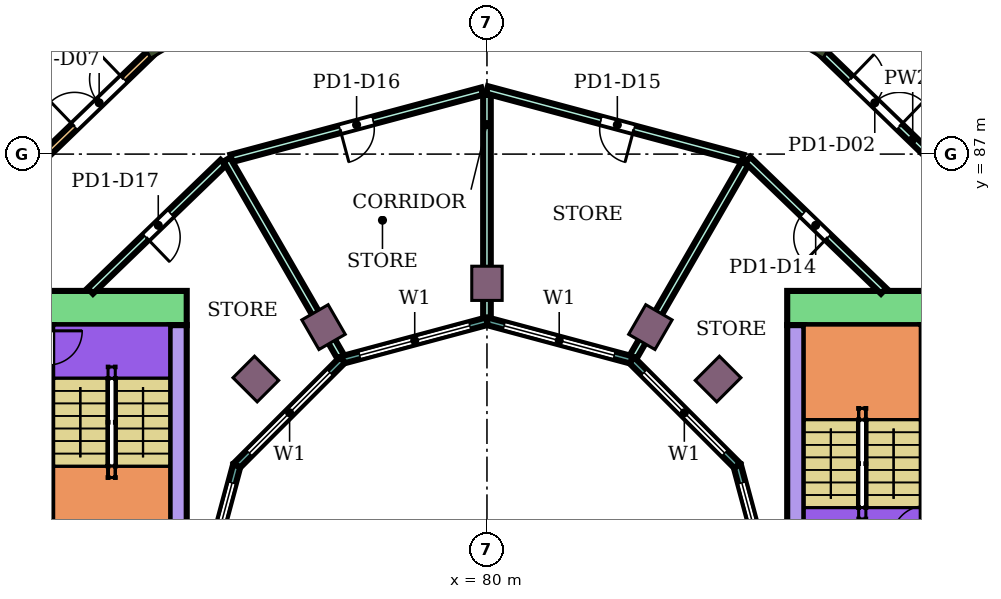
"""IFC4 building model, lengths in metres.
Left out: names, types, materials, properties, quantities, classifications, styles, units other than length and angle.
Written with IfcOpenShell. Run it as: python <this file> out.ifc"""

import sys

from ifc_helpers import new_model, si_unit, direction, frame, frame_2d, origin, origin_2d, place, context, subcontext, project, spatial, rectangle, extrude, element, fill, save


model = new_model("IFC4")
c1 = context("Model", 3, precision=1e-05, world=origin(), true_north=direction((0.0, 1.0)))
c2 = subcontext(c1, "Body", "Model", "MODEL_VIEW")
j1 = project(units=[si_unit("LENGTHUNIT", "METRE"), si_unit("PLANEANGLEUNIT", "RADIAN")], contexts=[c1])
p1 = place(None, origin())
s1 = spatial("IfcSite", under=j1, at=p1, CompositionType="ELEMENT")
p2 = place(p1, origin())
s2 = spatial("IfcBuilding", under=s1, at=p2, CompositionType="ELEMENT")
p3 = place(p2, frame((0.0, 0.0, 7.0)))
s3 = spatial("IfcBuildingStorey", under=s2, at=p3, CompositionType="ELEMENT", Elevation=7.0)
for number, where, z_axis, x_axis in (
    (1, (88.8, 90.242, 0.0), (0.0, 0.0, 1.0), (0.5, 0.866, 0.0)),
    (2, (71.2, 90.242, 0.0), (0.0, 0.0, 1.0), (-0.5, 0.866, 0.0)),
):
    element("IfcColumn", number, at=place(p3, frame(where, z_axis=z_axis, x_axis=x_axis)), inside=s3, PredefinedType="COLUMN", context=c2, shape_type="SweptSolid", body=[
        extrude(rectangle(XDim=1.2, YDim=0.8, at=origin_2d()), origin(), (0.0, 0.0, 1.0), 5.4),
    ])
for number, where, z_axis, x_axis in (
    (3, (86.081, 81.081, 0.0), (0.0, 0.0, 1.0), (0.707, 0.707, 0.0)),
    (4, (84.3, 82.448, 0.0), (0.0, 0.0, 1.0), (0.5, 0.866, 0.0)),
    (5, (80.0, 83.6, 0.0), (0.0, 0.0, 1.0), (0.0, 1.0, 0.0)),
    (6, (75.7, 82.448, 0.0), (0.0, 0.0, 1.0), (-0.5, 0.866, 0.0)),
    (7, (73.919, 81.081, 0.0), (0.0, 0.0, 1.0), (-0.707, 0.707, 0.0)),
):
    element("IfcColumn", number, at=place(p3, frame(where, z_axis=z_axis, x_axis=x_axis)), inside=s3, PredefinedType="COLUMN", context=c2, shape_type="SweptSolid", body=[
        extrude(rectangle(XDim=0.9, YDim=0.8, at=origin_2d()), origin(), (0.0, 0.0, 1.0), 5.4),
    ])
p4 = place(p3, frame((87.9, 82.95, 0.0), z_axis=(0.0, 0.0, 1.0), x_axis=(1.0, 0.0, 0.0)))
e8 = element("IfcWall", 8, at=p4, inside=s3, PredefinedType="SHEAR", context=c2, shape_type="SweptSolid", body=[
    extrude(rectangle(XDim=14.6, YDim=0.9, at=frame_2d((7.3, 0.0))), origin(), (0.0, 0.0, 1.0), 4.95),
])
p5 = place(p4, frame((4.2, 0.0, 0.0)))
e9 = element("IfcOpeningElement", 9, at=p5, cuts=e8, PredefinedType="OPENING", context=c2, shape_type="SweptSolid", body=[
    extrude(rectangle(XDim=2.4, YDim=2.4, at=frame_2d((1.2, 1.2))), frame((0.0, 0.46, 0.0), z_axis=(0.0, -1.0, 0.0), x_axis=(1.0, 0.0, 0.0)), (0.0, 0.0, 1.0), 0.92),
])
p6 = place(p3, frame((88.125, 75.0, 0.0), z_axis=(0.0, 0.0, 1.0), x_axis=(0.0, 1.0, 0.0)))
e10 = element("IfcWall", 10, at=p6, inside=s3, PredefinedType="SHEAR", context=c2, shape_type="SweptSolid", body=[
    extrude(rectangle(XDim=7.5, YDim=0.45, at=frame_2d((3.75, 0.0))), origin(), (0.0, 0.0, 1.0), 4.95),
])
p7 = place(p3, frame((91.55, 75.0, 0.0), z_axis=(0.0, 0.0, 1.0), x_axis=(0.0, 1.0, 0.0)))
e11 = element("IfcWall", 11, at=p7, inside=s3, PredefinedType="SHEAR", context=c2, shape_type="SweptSolid", body=[
    extrude(rectangle(XDim=7.5, YDim=0.3, at=frame_2d((3.75, 0.0))), origin(), (0.0, 0.0, 1.0), 4.95),
])
p8 = place(p7, frame((1.85, 0.0, 0.0)))
e12 = element("IfcOpeningElement", 12, at=p8, cuts=e11, PredefinedType="OPENING", context=c2, shape_type="SweptSolid", body=[
    extrude(rectangle(XDim=0.9, YDim=2.1, at=frame_2d((0.45, 1.05))), frame((0.0, 0.16, 0.0), z_axis=(0.0, -1.0, 0.0), x_axis=(1.0, 0.0, 0.0)), (0.0, 0.0, 1.0), 0.32),
])
p9 = place(p3, frame((72.1, 82.95, 0.0), z_axis=(0.0, 0.0, 1.0), x_axis=(-1.0, 0.0, 0.0)))
e13 = element("IfcWall", 13, at=p9, inside=s3, PredefinedType="SHEAR", context=c2, shape_type="SweptSolid", body=[
    extrude(rectangle(XDim=14.6, YDim=0.9, at=frame_2d((7.3, 0.0))), origin(), (0.0, 0.0, 1.0), 4.95),
])
p10 = place(p9, frame((4.2, 0.0, 0.0)))
e14 = element("IfcOpeningElement", 14, at=p10, cuts=e13, PredefinedType="OPENING", context=c2, shape_type="SweptSolid", body=[
    extrude(rectangle(XDim=2.4, YDim=2.4, at=frame_2d((1.2, 1.2))), frame((0.0, 0.46, 0.0), z_axis=(0.0, -1.0, 0.0), x_axis=(1.0, 0.0, 0.0)), (0.0, 0.0, 1.0), 0.92),
])
p11 = place(p3, frame((71.875, 82.5, 0.0), z_axis=(0.0, 0.0, 1.0), x_axis=(0.0, -1.0, 0.0)))
e15 = element("IfcWall", 15, at=p11, inside=s3, PredefinedType="SHEAR", context=c2, shape_type="SweptSolid", body=[
    extrude(rectangle(XDim=7.5, YDim=0.45, at=frame_2d((3.75, 0.0))), origin(), (0.0, 0.0, 1.0), 4.95),
])
p12 = place(p3, frame((68.45, 82.5, 0.0), z_axis=(0.0, 0.0, 1.0), x_axis=(0.0, -1.0, 0.0)))
e16 = element("IfcWall", 16, at=p12, inside=s3, PredefinedType="SHEAR", context=c2, shape_type="SweptSolid", body=[
    extrude(rectangle(XDim=7.5, YDim=0.3, at=frame_2d((3.75, 0.0))), origin(), (0.0, 0.0, 1.0), 4.95),
])
p13 = place(p12, frame((0.15, 0.0, 0.0)))
e17 = element("IfcOpeningElement", 17, at=p13, cuts=e16, PredefinedType="OPENING", context=c2, shape_type="SweptSolid", body=[
    extrude(rectangle(XDim=0.9, YDim=2.1, at=frame_2d((0.45, 1.05))), frame((0.0, 0.16, 0.0), z_axis=(0.0, -1.0, 0.0), x_axis=(1.0, 0.0, 0.0)), (0.0, 0.0, 1.0), 0.32),
])
p14 = place(p3, frame((87.604, 75.0, 0.0), z_axis=(0.0, 0.0, 1.0), x_axis=(-0.258789828301, 0.965933654434, 0.0)))
e18 = element("IfcWall", 18, at=p14, inside=s3, PredefinedType="NOTDEFINED", context=c2, shape_type="SweptSolid", body=[
    extrude(rectangle(XDim=3.936, YDim=0.2, at=frame_2d((1.968, 0.0))), origin(), (0.0, 0.0, 1.0), 5.4),
])
p15 = place(p14, frame((0.468, 0.0, 0.9)))
e19 = element("IfcOpeningElement", 19, at=p15, cuts=e18, PredefinedType="OPENING", context=c2, shape_type="SweptSolid", body=[
    extrude(rectangle(XDim=3.0, YDim=2.3, at=frame_2d((1.5, 1.15))), frame((0.0, 0.11, 0.0), z_axis=(0.0, -1.0, 0.0), x_axis=(1.0, 0.0, 0.0)), (0.0, 0.0, 1.0), 0.22),
])
p16 = place(p3, frame((86.585, 78.802, 0.0), z_axis=(0.0, 0.0, 1.0), x_axis=(-0.707106781187, 0.707106781187, 0.0)))
e20 = element("IfcWall", 20, at=p16, inside=s3, PredefinedType="NOTDEFINED", context=c2, shape_type="SweptSolid", body=[
    extrude(rectangle(XDim=3.936, YDim=0.2, at=frame_2d((1.968, 0.0))), origin(), (0.0, 0.0, 1.0), 5.4),
])
p17 = place(p16, frame((0.468, 0.0, 0.9)))
e21 = element("IfcOpeningElement", 21, at=p17, cuts=e20, PredefinedType="OPENING", context=c2, shape_type="SweptSolid", body=[
    extrude(rectangle(XDim=3.0, YDim=2.3, at=frame_2d((1.5, 1.15))), frame((0.0, 0.11, 0.0), z_axis=(0.0, -1.0, 0.0), x_axis=(1.0, 0.0, 0.0)), (0.0, 0.0, 1.0), 0.22),
])
p18 = place(p3, frame((83.802, 81.585, 0.0), z_axis=(0.0, 0.0, 1.0), x_axis=(-0.965933654434, 0.258789828301, 0.0)))
e22 = element("IfcWall", 22, at=p18, inside=s3, PredefinedType="NOTDEFINED", context=c2, shape_type="SweptSolid", body=[
    extrude(rectangle(XDim=3.936, YDim=0.2, at=frame_2d((1.968, 0.0))), origin(), (0.0, 0.0, 1.0), 5.4),
])
p19 = place(p18, frame((0.468, 0.0, 0.9)))
e23 = element("IfcOpeningElement", 23, at=p19, cuts=e22, PredefinedType="OPENING", context=c2, shape_type="SweptSolid", body=[
    extrude(rectangle(XDim=3.0, YDim=2.3, at=frame_2d((1.5, 1.15))), frame((0.0, 0.11, 0.0), z_axis=(0.0, -1.0, 0.0), x_axis=(1.0, 0.0, 0.0)), (0.0, 0.0, 1.0), 0.22),
])
p20 = place(p3, frame((80.0, 82.604, 0.0), z_axis=(0.0, 0.0, 1.0), x_axis=(-0.965933654434, -0.258789828301, 0.0)))
e24 = element("IfcWall", 24, at=p20, inside=s3, PredefinedType="NOTDEFINED", context=c2, shape_type="SweptSolid", body=[
    extrude(rectangle(XDim=3.936, YDim=0.2, at=frame_2d((1.968, 0.0))), origin(), (0.0, 0.0, 1.0), 5.4),
])
p21 = place(p20, frame((0.468, 0.0, 0.9)))
e25 = element("IfcOpeningElement", 25, at=p21, cuts=e24, PredefinedType="OPENING", context=c2, shape_type="SweptSolid", body=[
    extrude(rectangle(XDim=3.0, YDim=2.3, at=frame_2d((1.5, 1.15))), frame((0.0, 0.11, 0.0), z_axis=(0.0, -1.0, 0.0), x_axis=(1.0, 0.0, 0.0)), (0.0, 0.0, 1.0), 0.22),
])
p22 = place(p3, frame((76.198, 81.585, 0.0), z_axis=(0.0, 0.0, 1.0), x_axis=(-0.707106781187, -0.707106781187, 0.0)))
e26 = element("IfcWall", 26, at=p22, inside=s3, PredefinedType="NOTDEFINED", context=c2, shape_type="SweptSolid", body=[
    extrude(rectangle(XDim=3.936, YDim=0.2, at=frame_2d((1.968, 0.0))), origin(), (0.0, 0.0, 1.0), 5.4),
])
p23 = place(p22, frame((0.468, 0.0, 0.9)))
e27 = element("IfcOpeningElement", 27, at=p23, cuts=e26, PredefinedType="OPENING", context=c2, shape_type="SweptSolid", body=[
    extrude(rectangle(XDim=3.0, YDim=2.3, at=frame_2d((1.5, 1.15))), frame((0.0, 0.11, 0.0), z_axis=(0.0, -1.0, 0.0), x_axis=(1.0, 0.0, 0.0)), (0.0, 0.0, 1.0), 0.22),
])
p24 = place(p3, frame((73.415, 78.802, 0.0), z_axis=(0.0, 0.0, 1.0), x_axis=(-0.258789828301, -0.965933654434, 0.0)))
e28 = element("IfcWall", 28, at=p24, inside=s3, PredefinedType="NOTDEFINED", context=c2, shape_type="SweptSolid", body=[
    extrude(rectangle(XDim=3.936, YDim=0.2, at=frame_2d((1.968, 0.0))), origin(), (0.0, 0.0, 1.0), 5.4),
])
p25 = place(p24, frame((0.468, 0.0, 0.9)))
e29 = element("IfcOpeningElement", 29, at=p25, cuts=e28, PredefinedType="OPENING", context=c2, shape_type="SweptSolid", body=[
    extrude(rectangle(XDim=3.0, YDim=2.3, at=frame_2d((1.5, 1.15))), frame((0.0, 0.11, 0.0), z_axis=(0.0, -1.0, 0.0), x_axis=(1.0, 0.0, 0.0)), (0.0, 0.0, 1.0), 0.22),
])
p26 = place(p3, frame((66.22, 84.9, 0.0), z_axis=(0.0, 0.0, 1.0), x_axis=(0.719621348931, 0.694366700068, 0.0)))
e30 = element("IfcWall", 30, at=p26, inside=s3, PredefinedType="PARTITIONING", context=c2, shape_type="SweptSolid", body=[
    extrude(rectangle(XDim=7.173, YDim=0.2, at=frame_2d((3.586, 0.0))), origin(), (0.0, 0.0, 1.0), 4.45),
])
p27 = place(p26, frame((4.069, 0.0, 0.0)))
e31 = element("IfcOpeningElement", 31, at=p27, cuts=e30, PredefinedType="OPENING", context=c2, shape_type="SweptSolid", body=[
    extrude(rectangle(XDim=1.8, YDim=2.1, at=frame_2d((0.9, 1.05))), frame((0.0, 0.11, 0.0), z_axis=(0.0, -1.0, 0.0), x_axis=(1.0, 0.0, 0.0)), (0.0, 0.0, 1.0), 0.22),
])
p28 = place(p26, frame((0.932, 0.0, 0.0)))
e32 = element("IfcOpeningElement", 32, at=p28, cuts=e30, PredefinedType="OPENING", context=c2, shape_type="SweptSolid", body=[
    extrude(rectangle(XDim=0.9, YDim=2.1, at=frame_2d((0.45, 1.05))), frame((0.0, 0.11, 0.0), z_axis=(0.0, -1.0, 0.0), x_axis=(1.0, 0.0, 0.0)), (0.0, 0.0, 1.0), 0.22),
])
p29 = place(p3, frame((69.563, 83.4, 0.0), z_axis=(0.0, 0.0, 1.0), x_axis=(0.719454254864, 0.694539829785, 0.0)))
e33 = element("IfcWall", 33, at=p29, inside=s3, PredefinedType="PARTITIONING", context=c2, shape_type="SweptSolid", body=[
    extrude(rectangle(XDim=4.86, YDim=0.2, at=frame_2d((2.43, 0.0))), origin(), (0.0, 0.0, 1.0), 4.95),
])
p30 = place(p29, frame((2.035, 0.0, 0.0)))
e34 = element("IfcOpeningElement", 34, at=p30, cuts=e33, PredefinedType="OPENING", context=c2, shape_type="SweptSolid", body=[
    extrude(rectangle(XDim=0.9, YDim=2.1, at=frame_2d((0.45, 1.05))), frame((0.0, 0.11, 0.0), z_axis=(0.0, -1.0, 0.0), x_axis=(1.0, 0.0, 0.0)), (0.0, 0.0, 1.0), 0.22),
])
p31 = place(p3, frame((73.274, 86.888, 0.0), z_axis=(0.0, 0.0, 1.0), x_axis=(0.965941353683, 0.258761089124, 0.0)))
e35 = element("IfcWall", 35, at=p31, inside=s3, PredefinedType="PARTITIONING", context=c2, shape_type="SweptSolid", body=[
    extrude(rectangle(XDim=6.833, YDim=0.2, at=frame_2d((3.417, 0.0))), origin(), (0.0, 0.0, 1.0), 4.95),
])
p32 = place(p31, frame((2.961, 0.0, 0.0)))
e36 = element("IfcOpeningElement", 36, at=p32, cuts=e35, PredefinedType="OPENING", context=c2, shape_type="SweptSolid", body=[
    extrude(rectangle(XDim=0.9, YDim=2.1, at=frame_2d((0.45, 1.05))), frame((0.0, 0.11, 0.0), z_axis=(0.0, -1.0, 0.0), x_axis=(1.0, 0.0, 0.0)), (0.0, 0.0, 1.0), 0.22),
])
p33 = place(p3, frame((73.155, 86.856, 0.0), z_axis=(0.0, 0.0, 1.0), x_axis=(0.499999919892, -0.866025450035, 0.0)))
e37 = element("IfcWall", 37, at=p33, inside=s3, PredefinedType="PARTITIONING", context=c2, shape_type="SweptSolid", body=[
    extrude(rectangle(XDim=5.992, YDim=0.2, at=frame_2d((2.996, 0.0))), origin(), (0.0, 0.0, 1.0), 4.95),
])
p34 = place(p3, frame((80.0, 82.699, 0.0), z_axis=(0.0, 0.0, 1.0), x_axis=(0.0, 1.0, 0.0)))
e38 = element("IfcWall", 38, at=p34, inside=s3, PredefinedType="PARTITIONING", context=c2, shape_type="SweptSolid", body=[
    extrude(rectangle(XDim=5.861, YDim=0.2, at=frame_2d((2.931, 0.0))), origin(), (0.0, 0.0, 1.0), 4.95),
])
p35 = place(p3, frame((80.0, 88.69, 0.0), z_axis=(0.0, 0.0, 1.0), x_axis=(0.965929896633, -0.258803853893, 0.0)))
e39 = element("IfcWall", 39, at=p35, inside=s3, PredefinedType="PARTITIONING", context=c2, shape_type="SweptSolid", body=[
    extrude(rectangle(XDim=6.963, YDim=0.2, at=frame_2d((3.481, 0.0))), origin(), (0.0, 0.0, 1.0), 4.95),
])
p36 = place(p35, frame((3.102, 0.0, 0.0)))
e40 = element("IfcOpeningElement", 40, at=p36, cuts=e39, PredefinedType="OPENING", context=c2, shape_type="SweptSolid", body=[
    extrude(rectangle(XDim=0.9, YDim=2.1, at=frame_2d((0.45, 1.05))), frame((0.0, 0.11, 0.0), z_axis=(0.0, -1.0, 0.0), x_axis=(1.0, 0.0, 0.0)), (0.0, 0.0, 1.0), 0.22),
])
p37 = place(p3, frame((83.85, 81.667, 0.0), z_axis=(0.0, 0.0, 1.0), x_axis=(0.500029580911, 0.866008324564, 0.0)))
e41 = element("IfcWall", 41, at=p37, inside=s3, PredefinedType="PARTITIONING", context=c2, shape_type="SweptSolid", body=[
    extrude(rectangle(XDim=5.872, YDim=0.2, at=frame_2d((2.936, 0.0))), origin(), (0.0, 0.0, 1.0), 4.95),
])
p38 = place(p3, frame((86.861, 86.852, 0.0), z_axis=(0.0, 0.0, 1.0), x_axis=(0.719448855188, -0.694545423114, 0.0)))
e42 = element("IfcWall", 42, at=p38, inside=s3, PredefinedType="PARTITIONING", context=c2, shape_type="SweptSolid", body=[
    extrude(rectangle(XDim=4.97, YDim=0.2, at=frame_2d((2.485, 0.0))), origin(), (0.0, 0.0, 1.0), 4.95),
])
p39 = place(p38, frame((2.035, 0.0, 0.0)))
e43 = element("IfcOpeningElement", 43, at=p39, cuts=e42, PredefinedType="OPENING", context=c2, shape_type="SweptSolid", body=[
    extrude(rectangle(XDim=0.9, YDim=2.1, at=frame_2d((0.45, 1.05))), frame((0.0, 0.11, 0.0), z_axis=(0.0, -1.0, 0.0), x_axis=(1.0, 0.0, 0.0)), (0.0, 0.0, 1.0), 0.22),
])
p40 = place(p3, frame((88.668, 89.832, 0.0), z_axis=(0.0, 0.0, 1.0), x_axis=(0.71956091863, -0.694429322811, 0.0)))
e44 = element("IfcWall", 44, at=p40, inside=s3, PredefinedType="PARTITIONING", context=c2, shape_type="SweptSolid", body=[
    extrude(rectangle(XDim=7.043, YDim=0.2, at=frame_2d((3.521, 0.0))), origin(), (0.0, 0.0, 1.0), 4.95),
])
p41 = place(p40, frame((4.821, 0.0, 0.0)))
e45 = element("IfcOpeningElement", 45, at=p41, cuts=e44, PredefinedType="OPENING", context=c2, shape_type="SweptSolid", body=[
    extrude(rectangle(XDim=1.8, YDim=2.1, at=frame_2d((0.9, 1.05))), frame((0.0, 0.11, 0.0), z_axis=(0.0, -1.0, 0.0), x_axis=(1.0, 0.0, 0.0)), (0.0, 0.0, 1.0), 0.22),
])
p42 = place(p40, frame((1.234, 0.0, 0.0)))
e46 = element("IfcOpeningElement", 46, at=p42, cuts=e44, PredefinedType="OPENING", context=c2, shape_type="SweptSolid", body=[
    extrude(rectangle(XDim=1.8, YDim=2.1, at=frame_2d((0.9, 1.05))), frame((0.0, 0.11, 0.0), z_axis=(0.0, -1.0, 0.0), x_axis=(1.0, 0.0, 0.0)), (0.0, 0.0, 1.0), 0.22),
])
p43 = place(p15, origin())
e47 = element("IfcWindow", 47, at=p43, inside=s3, PartitioningType="SINGLE_PANEL", PredefinedType="WINDOW", context=c2, shape_type="SweptSolid", body=[
    extrude(rectangle(XDim=3.0, YDim=2.3, at=frame_2d((1.5, 1.15))), frame((0.0, 0.03, 0.0), z_axis=(0.0, -1.0, 0.0), x_axis=(1.0, 0.0, 0.0)), (0.0, 0.0, 1.0), 0.06),
])
fill(e19, e47)
p44 = place(p17, origin())
e48 = element("IfcWindow", 48, at=p44, inside=s3, PartitioningType="SINGLE_PANEL", PredefinedType="WINDOW", context=c2, shape_type="SweptSolid", body=[
    extrude(rectangle(XDim=3.0, YDim=2.3, at=frame_2d((1.5, 1.15))), frame((0.0, 0.03, 0.0), z_axis=(0.0, -1.0, 0.0), x_axis=(1.0, 0.0, 0.0)), (0.0, 0.0, 1.0), 0.06),
])
fill(e21, e48)
p45 = place(p19, origin())
e49 = element("IfcWindow", 49, at=p45, inside=s3, PartitioningType="SINGLE_PANEL", PredefinedType="WINDOW", context=c2, shape_type="SweptSolid", body=[
    extrude(rectangle(XDim=3.0, YDim=2.3, at=frame_2d((1.5, 1.15))), frame((0.0, 0.03, 0.0), z_axis=(0.0, -1.0, 0.0), x_axis=(1.0, 0.0, 0.0)), (0.0, 0.0, 1.0), 0.06),
])
fill(e23, e49)
p46 = place(p21, origin())
e50 = element("IfcWindow", 50, at=p46, inside=s3, PartitioningType="SINGLE_PANEL", PredefinedType="WINDOW", context=c2, shape_type="SweptSolid", body=[
    extrude(rectangle(XDim=3.0, YDim=2.3, at=frame_2d((1.5, 1.15))), frame((0.0, 0.03, 0.0), z_axis=(0.0, -1.0, 0.0), x_axis=(1.0, 0.0, 0.0)), (0.0, 0.0, 1.0), 0.06),
])
fill(e25, e50)
p47 = place(p23, origin())
e51 = element("IfcWindow", 51, at=p47, inside=s3, PartitioningType="SINGLE_PANEL", PredefinedType="WINDOW", context=c2, shape_type="SweptSolid", body=[
    extrude(rectangle(XDim=3.0, YDim=2.3, at=frame_2d((1.5, 1.15))), frame((0.0, 0.03, 0.0), z_axis=(0.0, -1.0, 0.0), x_axis=(1.0, 0.0, 0.0)), (0.0, 0.0, 1.0), 0.06),
])
fill(e27, e51)
p48 = place(p25, origin())
e52 = element("IfcWindow", 52, at=p48, inside=s3, PartitioningType="SINGLE_PANEL", PredefinedType="WINDOW", context=c2, shape_type="SweptSolid", body=[
    extrude(rectangle(XDim=3.0, YDim=2.3, at=frame_2d((1.5, 1.15))), frame((0.0, 0.03, 0.0), z_axis=(0.0, -1.0, 0.0), x_axis=(1.0, 0.0, 0.0)), (0.0, 0.0, 1.0), 0.06),
])
fill(e29, e52)
p49 = place(p42, origin())
e53 = element("IfcDoor", 53, at=p49, inside=s3, OperationType="DOUBLE_DOOR_SINGLE_SWING", PredefinedType="DOOR", context=c2, shape_type="SweptSolid", body=[
    extrude(rectangle(XDim=1.8, YDim=2.1, at=frame_2d((0.9, 1.05))), frame((0.0, 0.025, 0.0), z_axis=(0.0, -1.0, 0.0), x_axis=(1.0, 0.0, 0.0)), (0.0, 0.0, 1.0), 0.05),
])
fill(e46, e53)
p50 = place(p27, origin())
e54 = element("IfcDoor", 54, at=p50, inside=s3, OperationType="DOUBLE_DOOR_SINGLE_SWING", PredefinedType="DOOR", context=c2, shape_type="SweptSolid", body=[
    extrude(rectangle(XDim=1.8, YDim=2.1, at=frame_2d((0.9, 1.05))), frame((0.0, 0.025, 0.0), z_axis=(0.0, -1.0, 0.0), x_axis=(1.0, 0.0, 0.0)), (0.0, 0.0, 1.0), 0.05),
])
fill(e31, e54)
p51 = place(p39, frame((0.9, 0.0, 0.0), z_axis=(0.0, 0.0, 1.0), x_axis=(-1.0, 0.0, 0.0)))
e55 = element("IfcDoor", 55, at=p51, inside=s3, OperationType="SINGLE_SWING_LEFT", PredefinedType="DOOR", context=c2, shape_type="SweptSolid", body=[
    extrude(rectangle(XDim=0.9, YDim=2.1, at=frame_2d((0.45, 1.05))), frame((0.0, 0.025, 0.0), z_axis=(0.0, -1.0, 0.0), x_axis=(1.0, 0.0, 0.0)), (0.0, 0.0, 1.0), 0.05),
])
fill(e43, e55)
p52 = place(p36, frame((0.9, 0.0, 0.0), z_axis=(0.0, 0.0, 1.0), x_axis=(-1.0, 0.0, 0.0)))
e56 = element("IfcDoor", 56, at=p52, inside=s3, OperationType="SINGLE_SWING_LEFT", PredefinedType="DOOR", context=c2, shape_type="SweptSolid", body=[
    extrude(rectangle(XDim=0.9, YDim=2.1, at=frame_2d((0.45, 1.05))), frame((0.0, 0.025, 0.0), z_axis=(0.0, -1.0, 0.0), x_axis=(1.0, 0.0, 0.0)), (0.0, 0.0, 1.0), 0.05),
])
fill(e40, e56)
p53 = place(p32, frame((0.9, 0.0, 0.0), z_axis=(0.0, 0.0, 1.0), x_axis=(-1.0, 0.0, 0.0)))
e57 = element("IfcDoor", 57, at=p53, inside=s3, OperationType="SINGLE_SWING_RIGHT", PredefinedType="DOOR", context=c2, shape_type="SweptSolid", body=[
    extrude(rectangle(XDim=0.9, YDim=2.1, at=frame_2d((0.45, 1.05))), frame((0.0, 0.025, 0.0), z_axis=(0.0, -1.0, 0.0), x_axis=(1.0, 0.0, 0.0)), (0.0, 0.0, 1.0), 0.05),
])
fill(e36, e57)
p54 = place(p30, frame((0.9, 0.0, 0.0), z_axis=(0.0, 0.0, 1.0), x_axis=(-1.0, 0.0, 0.0)))
e58 = element("IfcDoor", 58, at=p54, inside=s3, OperationType="SINGLE_SWING_RIGHT", PredefinedType="DOOR", context=c2, shape_type="SweptSolid", body=[
    extrude(rectangle(XDim=0.9, YDim=2.1, at=frame_2d((0.45, 1.05))), frame((0.0, 0.025, 0.0), z_axis=(0.0, -1.0, 0.0), x_axis=(1.0, 0.0, 0.0)), (0.0, 0.0, 1.0), 0.05),
])
fill(e34, e58)
save(model, sys.argv[1])
